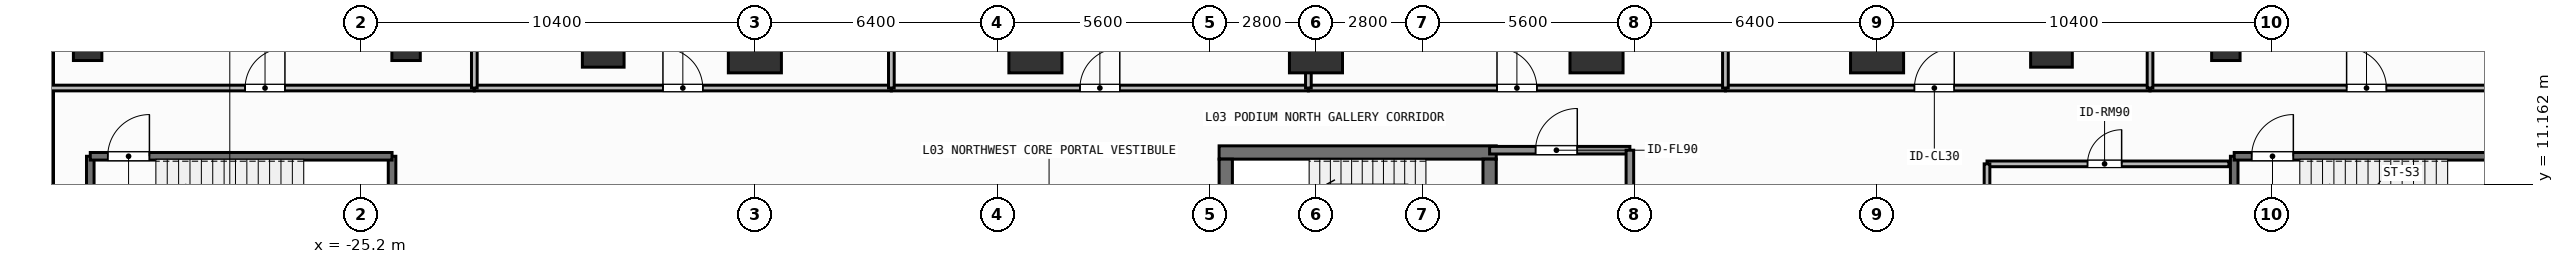
"""IFC4 building model, lengths in metres.
Left out: names, types, materials, properties, quantities, classifications, styles, units other than length and angle.
Written with IfcOpenShell. Run it as: python <this file> out.ifc"""

import sys

from ifc_helpers import new_model, si_unit, direction, frame, frame_2d, origin, origin_2d, place, context, subcontext, project, spatial, rectangle, extrude, element, fill, save


model = new_model("IFC4")
c1 = context("Model", 3, precision=1e-05, world=origin(), true_north=direction((0.0, 1.0)))
c2 = subcontext(c1, "Body", "Model", "MODEL_VIEW")
j1 = project(units=[si_unit("LENGTHUNIT", "METRE"), si_unit("PLANEANGLEUNIT", "RADIAN")], contexts=[c1])
p1 = place(None, origin())
s1 = spatial("IfcSite", under=j1, at=p1, CompositionType="ELEMENT")
p2 = place(p1, origin())
s2 = spatial("IfcBuilding", under=s1, at=p2, CompositionType="ELEMENT")
p3 = place(p2, frame((0.0, 0.0, 9.0)))
s3 = spatial("IfcBuildingStorey", under=s2, at=p3, CompositionType="ELEMENT", Elevation=9.0)
p4 = place(p3, frame((-2.555, 12.0, 0.0), z_axis=(0.0, 0.0, 1.0), x_axis=(1.0, 0.0, 0.0)))
e1 = element("IfcWall", 1, at=p4, inside=s3, PredefinedType="SHEAR", context=c2, shape_type="SweptSolid", body=[
    extrude(rectangle(XDim=7.31, YDim=0.35, at=frame_2d((3.655, 0.0))), origin(), (0.0, 0.0, 1.0), 4.2),
])
p5 = place(p3, frame((-2.38, 8.9, 0.0), z_axis=(0.0, 0.0, 1.0), x_axis=(0.0, 1.0, 0.0)))
e2 = element("IfcWall", 2, at=p5, inside=s3, PredefinedType="SHEAR", context=c2, shape_type="SweptSolid", body=[
    extrude(rectangle(XDim=2.925, YDim=0.35, at=frame_2d((1.462, 0.0))), origin(), (0.0, 0.0, 1.0), 4.2),
])
p6 = place(p3, frame((4.58, 11.825, 0.0), z_axis=(0.0, 0.0, 1.0), x_axis=(0.0, -1.0, 0.0)))
e3 = element("IfcWall", 3, at=p6, inside=s3, PredefinedType="SHEAR", context=c2, shape_type="SweptSolid", body=[
    extrude(rectangle(XDim=2.925, YDim=0.35, at=frame_2d((1.462, 0.0))), origin(), (0.0, 0.0, 1.0), 4.2),
])
p7 = place(p6, frame((0.913, 0.0, 0.0)))
e4 = element("IfcOpeningElement", 4, at=p7, cuts=e3, PredefinedType="OPENING", context=c2, shape_type="SweptSolid", body=[
    extrude(rectangle(XDim=1.1, YDim=2.15, at=frame_2d((0.55, 1.075))), frame((0.0, 0.185, 0.0), z_axis=(0.0, -1.0, 0.0), x_axis=(1.0, 0.0, 0.0)), (0.0, 0.0, 1.0), 0.37),
])
for number, where, z_axis, x_axis in (
    (5, (-14.8, 14.8, 0.0), (0.0, 0.0, 1.0), (1.0, 0.0, 0.0)),
    (6, (-7.4, 14.8, 0.0), (0.0, 0.0, 1.0), (1.0, 0.0, 0.0)),
    (7, (0.0, 14.8, 0.0), (0.0, 0.0, 1.0), (1.0, 0.0, 0.0)),
    (8, (7.4, 14.8, 0.0), (0.0, 0.0, 1.0), (1.0, 0.0, 0.0)),
    (9, (14.8, 14.8, 0.0), (0.0, 0.0, 1.0), (1.0, 0.0, 0.0)),
):
    element("IfcColumn", number, at=place(p3, frame(where, z_axis=z_axis, x_axis=x_axis)), inside=s3, PredefinedType="COLUMN", context=c2, shape_type="SweptSolid", body=[
        extrude(rectangle(XDim=1.4, YDim=1.4, at=origin_2d()), origin(), (0.0, 0.0, 1.0), 4.2),
    ])
for number, where, z_axis, x_axis in (
    (10, (-18.8, 14.8, 0.0), (0.0, 0.0, 1.0), (1.0, 0.0, 0.0)),
    (11, (19.4, 14.8, 0.0), (0.0, 0.0, 1.0), (1.0, 0.0, 0.0)),
):
    element("IfcColumn", number, at=place(p3, frame(where, z_axis=z_axis, x_axis=x_axis)), inside=s3, PredefinedType="COLUMN", context=c2, shape_type="SweptSolid", body=[
        extrude(rectangle(XDim=1.1, YDim=1.1, at=origin_2d()), origin(), (0.0, 0.0, 1.0), 4.2),
    ])
for number, where, z_axis, x_axis in (
    (12, (-32.4, 14.8, 0.0), (0.0, 0.0, 1.0), (1.0, 0.0, 0.0)),
    (13, (-24.0, 14.8, 0.0), (0.0, 0.0, 1.0), (1.0, 0.0, 0.0)),
    (14, (24.0, 14.8, 0.0), (0.0, 0.0, 1.0), (1.0, 0.0, 0.0)),
):
    element("IfcColumn", number, at=place(p3, frame(where, z_axis=z_axis, x_axis=x_axis)), inside=s3, PredefinedType="COLUMN", context=c2, shape_type="SweptSolid", body=[
        extrude(rectangle(XDim=0.75, YDim=0.75, at=origin_2d()), origin(), (0.0, 0.0, 1.0), 4.2),
    ])
p8 = place(p3, frame((-33.45, 6.41, 0.0), z_axis=(0.0, 0.0, 1.0), x_axis=(0.0, 1.0, 0.0)))
e15 = element("IfcWall", 15, at=p8, inside=s3, PredefinedType="SOLIDWALL", context=c2, shape_type="SweptSolid", body=[
    extrude(rectangle(XDim=14.09, YDim=0.3, at=frame_2d((7.045, 0.0))), origin(), (0.0, 0.0, 1.0), 3.96),
])
for number, where, z_axis, x_axis in (
    (16, (-32.33, 8.48, 0.0), (0.0, 0.0, 1.0), (0.0, 1.0, 0.0)),
    (17, (-24.37, 11.9, 0.0), (0.0, 0.0, 1.0), (0.0, -1.0, 0.0)),
):
    element("IfcWall", number, at=place(p3, frame(where, z_axis=z_axis, x_axis=x_axis)), inside=s3, PredefinedType="SHEAR", context=c2, shape_type="SweptSolid", body=[
        extrude(rectangle(XDim=3.42, YDim=0.2, at=frame_2d((1.71, 0.0))), origin(), (0.0, 0.0, 1.0), 3.96),
    ])
p9 = place(p3, frame((-32.33, 11.9, 0.0), z_axis=(0.0, 0.0, 1.0), x_axis=(1.0, 0.0, 0.0)))
e18 = element("IfcWall", 18, at=p9, inside=s3, PredefinedType="SHEAR", context=c2, shape_type="SweptSolid", body=[
    extrude(rectangle(XDim=7.96, YDim=0.2, at=frame_2d((3.98, 0.0))), origin(), (0.0, 0.0, 1.0), 3.96),
])
p10 = place(p9, frame((0.46, 0.0, 0.0)))
e19 = element("IfcOpeningElement", 19, at=p10, cuts=e18, PredefinedType="OPENING", context=c2, shape_type="SweptSolid", body=[
    extrude(rectangle(XDim=1.1, YDim=2.15, at=frame_2d((0.55, 1.075))), frame((0.0, 0.11, 0.0), z_axis=(0.0, -1.0, 0.0), x_axis=(1.0, 0.0, 0.0)), (0.0, 0.0, 1.0), 0.22),
])
p11 = place(p3, frame((24.22, 8.48, 0.0), z_axis=(0.0, 0.0, 1.0), x_axis=(0.0, 1.0, 0.0)))
e20 = element("IfcWall", 20, at=p11, inside=s3, PredefinedType="SHEAR", context=c2, shape_type="SweptSolid", body=[
    extrude(rectangle(XDim=3.42, YDim=0.2, at=frame_2d((1.71, 0.0))), origin(), (0.0, 0.0, 1.0), 3.96),
])
p12 = place(p3, frame((24.22, 11.9, 0.0), z_axis=(0.0, 0.0, 1.0), x_axis=(1.0, 0.0, 0.0)))
e21 = element("IfcWall", 21, at=p12, inside=s3, PredefinedType="SHEAR", context=c2, shape_type="SweptSolid", body=[
    extrude(rectangle(XDim=7.96, YDim=0.2, at=frame_2d((3.98, 0.0))), origin(), (0.0, 0.0, 1.0), 3.96),
])
p13 = place(p12, frame((0.46, 0.0, 0.0)))
e22 = element("IfcOpeningElement", 22, at=p13, cuts=e21, PredefinedType="OPENING", context=c2, shape_type="SweptSolid", body=[
    extrude(rectangle(XDim=1.1, YDim=2.15, at=frame_2d((0.55, 1.075))), frame((0.0, 0.11, 0.0), z_axis=(0.0, -1.0, 0.0), x_axis=(1.0, 0.0, 0.0)), (0.0, 0.0, 1.0), 0.22),
])
p14 = place(p3, frame((4.58, 12.06, 0.0), z_axis=(0.0, 0.0, 1.0), x_axis=(1.0, 0.0, 0.0)))
e23 = element("IfcWall", 23, at=p14, inside=s3, PredefinedType="SOLIDWALL", context=c2, shape_type="SweptSolid", body=[
    extrude(rectangle(XDim=3.7, YDim=0.2, at=frame_2d((1.85, 0.0))), origin(), (0.0, 0.0, 1.0), 3.96),
])
p15 = place(p14, frame((1.212, 0.0, 0.0)))
e24 = element("IfcOpeningElement", 24, at=p15, cuts=e23, PredefinedType="OPENING", context=c2, shape_type="SweptSolid", body=[
    extrude(rectangle(XDim=1.1, YDim=2.15, at=frame_2d((0.55, 1.075))), frame((0.0, 0.11, 0.0), z_axis=(0.0, -1.0, 0.0), x_axis=(1.0, 0.0, 0.0)), (0.0, 0.0, 1.0), 0.22),
])
p16 = place(p3, frame((-33.42, 13.7, 0.0), z_axis=(0.0, 0.0, 1.0), x_axis=(1.0, 0.0, 0.0)))
e25 = element("IfcWall", 25, at=p16, inside=s3, PredefinedType="PARTITIONING", context=c2, shape_type="SweptSolid", body=[
    extrude(rectangle(XDim=11.22, YDim=0.15, at=frame_2d((5.61, 0.0))), origin(), (0.0, 0.0, 1.0), 3.96),
])
p17 = place(p16, frame((5.175, 0.0, 0.0)))
e26 = element("IfcOpeningElement", 26, at=p17, cuts=e25, PredefinedType="OPENING", context=c2, shape_type="SweptSolid", body=[
    extrude(rectangle(XDim=1.05, YDim=2.2, at=frame_2d((0.525, 1.1))), frame((0.0, 0.085, 0.0), z_axis=(0.0, -1.0, 0.0), x_axis=(1.0, 0.0, 0.0)), (0.0, 0.0, 1.0), 0.17),
])
p18 = place(p3, frame((-22.2, 13.7, 0.0), z_axis=(0.0, 0.0, 1.0), x_axis=(1.0, 0.0, 0.0)))
e27 = element("IfcWall", 27, at=p18, inside=s3, PredefinedType="PARTITIONING", context=c2, shape_type="SweptSolid", body=[
    extrude(rectangle(XDim=11.0, YDim=0.15, at=frame_2d((5.5, 0.0))), origin(), (0.0, 0.0, 1.0), 3.96),
])
p19 = place(p18, frame((4.975, 0.0, 0.0)))
e28 = element("IfcOpeningElement", 28, at=p19, cuts=e27, PredefinedType="OPENING", context=c2, shape_type="SweptSolid", body=[
    extrude(rectangle(XDim=1.05, YDim=2.2, at=frame_2d((0.525, 1.1))), frame((0.0, 0.085, 0.0), z_axis=(0.0, -1.0, 0.0), x_axis=(1.0, 0.0, 0.0)), (0.0, 0.0, 1.0), 0.17),
])
p20 = place(p3, frame((-11.2, 13.7, 0.0), z_axis=(0.0, 0.0, 1.0), x_axis=(1.0, 0.0, 0.0)))
e29 = element("IfcWall", 29, at=p20, inside=s3, PredefinedType="PARTITIONING", context=c2, shape_type="SweptSolid", body=[
    extrude(rectangle(XDim=11.0, YDim=0.15, at=frame_2d((5.5, 0.0))), origin(), (0.0, 0.0, 1.0), 3.96),
])
p21 = place(p20, frame((4.975, 0.0, 0.0)))
e30 = element("IfcOpeningElement", 30, at=p21, cuts=e29, PredefinedType="OPENING", context=c2, shape_type="SweptSolid", body=[
    extrude(rectangle(XDim=1.05, YDim=2.2, at=frame_2d((0.525, 1.1))), frame((0.0, 0.085, 0.0), z_axis=(0.0, -1.0, 0.0), x_axis=(1.0, 0.0, 0.0)), (0.0, 0.0, 1.0), 0.17),
])
p22 = place(p3, frame((-0.2, 13.7, 0.0), z_axis=(0.0, 0.0, 1.0), x_axis=(1.0, 0.0, 0.0)))
e31 = element("IfcWall", 31, at=p22, inside=s3, PredefinedType="PARTITIONING", context=c2, shape_type="SweptSolid", body=[
    extrude(rectangle(XDim=11.0, YDim=0.15, at=frame_2d((5.5, 0.0))), origin(), (0.0, 0.0, 1.0), 3.96),
])
p23 = place(p22, frame((4.975, 0.0, 0.0)))
e32 = element("IfcOpeningElement", 32, at=p23, cuts=e31, PredefinedType="OPENING", context=c2, shape_type="SweptSolid", body=[
    extrude(rectangle(XDim=1.05, YDim=2.2, at=frame_2d((0.525, 1.1))), frame((0.0, 0.085, 0.0), z_axis=(0.0, -1.0, 0.0), x_axis=(1.0, 0.0, 0.0)), (0.0, 0.0, 1.0), 0.17),
])
p24 = place(p3, frame((10.8, 13.7, 0.0), z_axis=(0.0, 0.0, 1.0), x_axis=(1.0, 0.0, 0.0)))
e33 = element("IfcWall", 33, at=p24, inside=s3, PredefinedType="PARTITIONING", context=c2, shape_type="SweptSolid", body=[
    extrude(rectangle(XDim=11.2, YDim=0.15, at=frame_2d((5.6, 0.0))), origin(), (0.0, 0.0, 1.0), 3.96),
])
p25 = place(p24, frame((4.986, 0.0, 0.0)))
e34 = element("IfcOpeningElement", 34, at=p25, cuts=e33, PredefinedType="OPENING", context=c2, shape_type="SweptSolid", body=[
    extrude(rectangle(XDim=1.05, YDim=2.2, at=frame_2d((0.525, 1.1))), frame((0.0, 0.085, 0.0), z_axis=(0.0, -1.0, 0.0), x_axis=(1.0, 0.0, 0.0)), (0.0, 0.0, 1.0), 0.17),
])
p26 = place(p3, frame((22.0, 13.7, 0.0), z_axis=(0.0, 0.0, 1.0), x_axis=(1.0, 0.0, 0.0)))
e35 = element("IfcWall", 35, at=p26, inside=s3, PredefinedType="PARTITIONING", context=c2, shape_type="SweptSolid", body=[
    extrude(rectangle(XDim=11.42, YDim=0.15, at=frame_2d((5.71, 0.0))), origin(), (0.0, 0.0, 1.0), 3.96),
])
p27 = place(p26, frame((5.185, 0.0, 0.0)))
e36 = element("IfcOpeningElement", 36, at=p27, cuts=e35, PredefinedType="OPENING", context=c2, shape_type="SweptSolid", body=[
    extrude(rectangle(XDim=1.05, YDim=2.2, at=frame_2d((0.525, 1.1))), frame((0.0, 0.085, 0.0), z_axis=(0.0, -1.0, 0.0), x_axis=(1.0, 0.0, 0.0)), (0.0, 0.0, 1.0), 0.17),
])
p28 = place(p3, frame((17.7, 11.7, 0.0), z_axis=(0.0, 0.0, 1.0), x_axis=(1.0, 0.0, 0.0)))
e37 = element("IfcWall", 37, at=p28, inside=s3, PredefinedType="PARTITIONING", context=c2, shape_type="SweptSolid", body=[
    extrude(rectangle(XDim=6.38, YDim=0.15, at=frame_2d((3.19, 0.0))), origin(), (0.0, 0.0, 1.0), 3.96),
])
p29 = place(p28, frame((2.651, 0.0, 0.0)))
e38 = element("IfcOpeningElement", 38, at=p29, cuts=e37, PredefinedType="OPENING", context=c2, shape_type="SweptSolid", body=[
    extrude(rectangle(XDim=0.9, YDim=2.1, at=frame_2d((0.45, 1.05))), frame((0.0, 0.085, 0.0), z_axis=(0.0, -1.0, 0.0), x_axis=(1.0, 0.0, 0.0)), (0.0, 0.0, 1.0), 0.17),
])
p30 = place(p3, frame((8.28, 8.95, 0.0), z_axis=(0.0, 0.0, 1.0), x_axis=(0.0, 1.0, 0.0)))
e39 = element("IfcWall", 39, at=p30, inside=s3, PredefinedType="SOLIDWALL", context=c2, shape_type="SweptSolid", body=[
    extrude(rectangle(XDim=3.11, YDim=0.2, at=frame_2d((1.555, 0.0))), origin(), (0.0, 0.0, 1.0), 3.96),
])
for number, where, z_axis, x_axis in (
    (40, (-22.2, 13.7, 0.0), (0.0, 0.0, 1.0), (0.0, 1.0, 0.0)),
    (41, (-11.2, 13.7, 0.0), (0.0, 0.0, 1.0), (0.0, 1.0, 0.0)),
):
    element("IfcWall", number, at=place(p3, frame(where, z_axis=z_axis, x_axis=x_axis)), inside=s3, PredefinedType="PARTITIONING", context=c2, shape_type="SweptSolid", body=[
        extrude(rectangle(XDim=11.22, YDim=0.15, at=frame_2d((5.61, 0.0))), origin(), (0.0, 0.0, 1.0), 3.96),
    ])
p31 = place(p3, frame((-0.2, 13.7, 0.0), z_axis=(0.0, 0.0, 1.0), x_axis=(0.0, 1.0, 0.0)))
e42 = element("IfcWall", 42, at=p31, inside=s3, PredefinedType="PARTITIONING", context=c2, shape_type="SweptSolid", body=[
    extrude(rectangle(XDim=11.22, YDim=0.15, at=frame_2d((5.61, 0.0))), origin(), (0.0, 0.0, 1.0), 3.05),
])
for number, where, z_axis, x_axis in (
    (43, (10.8, 13.7, 0.0), (0.0, 0.0, 1.0), (0.0, 1.0, 0.0)),
    (44, (22.0, 13.7, 0.0), (0.0, 0.0, 1.0), (0.0, 1.0, 0.0)),
):
    element("IfcWall", number, at=place(p3, frame(where, z_axis=z_axis, x_axis=x_axis)), inside=s3, PredefinedType="PARTITIONING", context=c2, shape_type="SweptSolid", body=[
        extrude(rectangle(XDim=11.22, YDim=0.15, at=frame_2d((5.61, 0.0))), origin(), (0.0, 0.0, 1.0), 3.96),
    ])
p32 = place(p3, frame((17.7, 6.95, 0.0), z_axis=(0.0, 0.0, 1.0), x_axis=(0.0, 1.0, 0.0)))
e45 = element("IfcWall", 45, at=p32, inside=s3, PredefinedType="PARTITIONING", context=c2, shape_type="SweptSolid", body=[
    extrude(rectangle(XDim=4.75, YDim=0.15, at=frame_2d((2.375, 0.0))), origin(), (0.0, 0.0, 1.0), 3.96),
])
p33 = place(p10, origin())
e46 = element("IfcDoor", 46, at=p33, inside=s3, OperationType="SINGLE_SWING_RIGHT", PredefinedType="DOOR", context=c2, shape_type="SweptSolid", body=[
    extrude(rectangle(XDim=1.1, YDim=2.15, at=frame_2d((0.55, 1.075))), frame((0.0, 0.025, 0.0), z_axis=(0.0, -1.0, 0.0), x_axis=(1.0, 0.0, 0.0)), (0.0, 0.0, 1.0), 0.05),
])
fill(e19, e46)
p34 = place(p13, origin())
e47 = element("IfcDoor", 47, at=p34, inside=s3, OperationType="SINGLE_SWING_RIGHT", PredefinedType="DOOR", context=c2, shape_type="SweptSolid", body=[
    extrude(rectangle(XDim=1.1, YDim=2.15, at=frame_2d((0.55, 1.075))), frame((0.0, 0.025, 0.0), z_axis=(0.0, -1.0, 0.0), x_axis=(1.0, 0.0, 0.0)), (0.0, 0.0, 1.0), 0.05),
])
fill(e22, e47)
p35 = place(p15, origin())
e48 = element("IfcDoor", 48, at=p35, inside=s3, OperationType="SINGLE_SWING_RIGHT", PredefinedType="DOOR", context=c2, shape_type="SweptSolid", body=[
    extrude(rectangle(XDim=1.1, YDim=2.15, at=frame_2d((0.55, 1.075))), frame((0.0, 0.025, 0.0), z_axis=(0.0, -1.0, 0.0), x_axis=(1.0, 0.0, 0.0)), (0.0, 0.0, 1.0), 0.05),
])
fill(e24, e48)
p36 = place(p17, origin())
e49 = element("IfcDoor", 49, at=p36, inside=s3, OperationType="SINGLE_SWING_RIGHT", PredefinedType="DOOR", context=c2, shape_type="SweptSolid", body=[
    extrude(rectangle(XDim=1.05, YDim=2.2, at=frame_2d((0.525, 1.1))), frame((0.0, 0.025, 0.0), z_axis=(0.0, -1.0, 0.0), x_axis=(1.0, 0.0, 0.0)), (0.0, 0.0, 1.0), 0.05),
])
fill(e26, e49)
p37 = place(p19, origin())
e50 = element("IfcDoor", 50, at=p37, inside=s3, OperationType="SINGLE_SWING_LEFT", PredefinedType="DOOR", context=c2, shape_type="SweptSolid", body=[
    extrude(rectangle(XDim=1.05, YDim=2.2, at=frame_2d((0.525, 1.1))), frame((0.0, 0.025, 0.0), z_axis=(0.0, -1.0, 0.0), x_axis=(1.0, 0.0, 0.0)), (0.0, 0.0, 1.0), 0.05),
])
fill(e28, e50)
p38 = place(p21, origin())
e51 = element("IfcDoor", 51, at=p38, inside=s3, OperationType="SINGLE_SWING_RIGHT", PredefinedType="DOOR", context=c2, shape_type="SweptSolid", body=[
    extrude(rectangle(XDim=1.05, YDim=2.2, at=frame_2d((0.525, 1.1))), frame((0.0, 0.025, 0.0), z_axis=(0.0, -1.0, 0.0), x_axis=(1.0, 0.0, 0.0)), (0.0, 0.0, 1.0), 0.05),
])
fill(e30, e51)
p39 = place(p23, origin())
e52 = element("IfcDoor", 52, at=p39, inside=s3, OperationType="SINGLE_SWING_LEFT", PredefinedType="DOOR", context=c2, shape_type="SweptSolid", body=[
    extrude(rectangle(XDim=1.05, YDim=2.2, at=frame_2d((0.525, 1.1))), frame((0.0, 0.025, 0.0), z_axis=(0.0, -1.0, 0.0), x_axis=(1.0, 0.0, 0.0)), (0.0, 0.0, 1.0), 0.05),
])
fill(e32, e52)
p40 = place(p25, origin())
e53 = element("IfcDoor", 53, at=p40, inside=s3, OperationType="SINGLE_SWING_RIGHT", PredefinedType="DOOR", context=c2, shape_type="SweptSolid", body=[
    extrude(rectangle(XDim=1.05, YDim=2.2, at=frame_2d((0.525, 1.1))), frame((0.0, 0.025, 0.0), z_axis=(0.0, -1.0, 0.0), x_axis=(1.0, 0.0, 0.0)), (0.0, 0.0, 1.0), 0.05),
])
fill(e34, e53)
p41 = place(p27, origin())
e54 = element("IfcDoor", 54, at=p41, inside=s3, OperationType="SINGLE_SWING_LEFT", PredefinedType="DOOR", context=c2, shape_type="SweptSolid", body=[
    extrude(rectangle(XDim=1.05, YDim=2.2, at=frame_2d((0.525, 1.1))), frame((0.0, 0.025, 0.0), z_axis=(0.0, -1.0, 0.0), x_axis=(1.0, 0.0, 0.0)), (0.0, 0.0, 1.0), 0.05),
])
fill(e36, e54)
p42 = place(p29, origin())
e55 = element("IfcDoor", 55, at=p42, inside=s3, OperationType="SINGLE_SWING_RIGHT", PredefinedType="DOOR", context=c2, shape_type="SweptSolid", body=[
    extrude(rectangle(XDim=0.9, YDim=2.1, at=frame_2d((0.45, 1.05))), frame((0.0, 0.025, 0.0), z_axis=(0.0, -1.0, 0.0), x_axis=(1.0, 0.0, 0.0)), (0.0, 0.0, 1.0), 0.05),
])
fill(e38, e55)
save(model, sys.argv[1])
